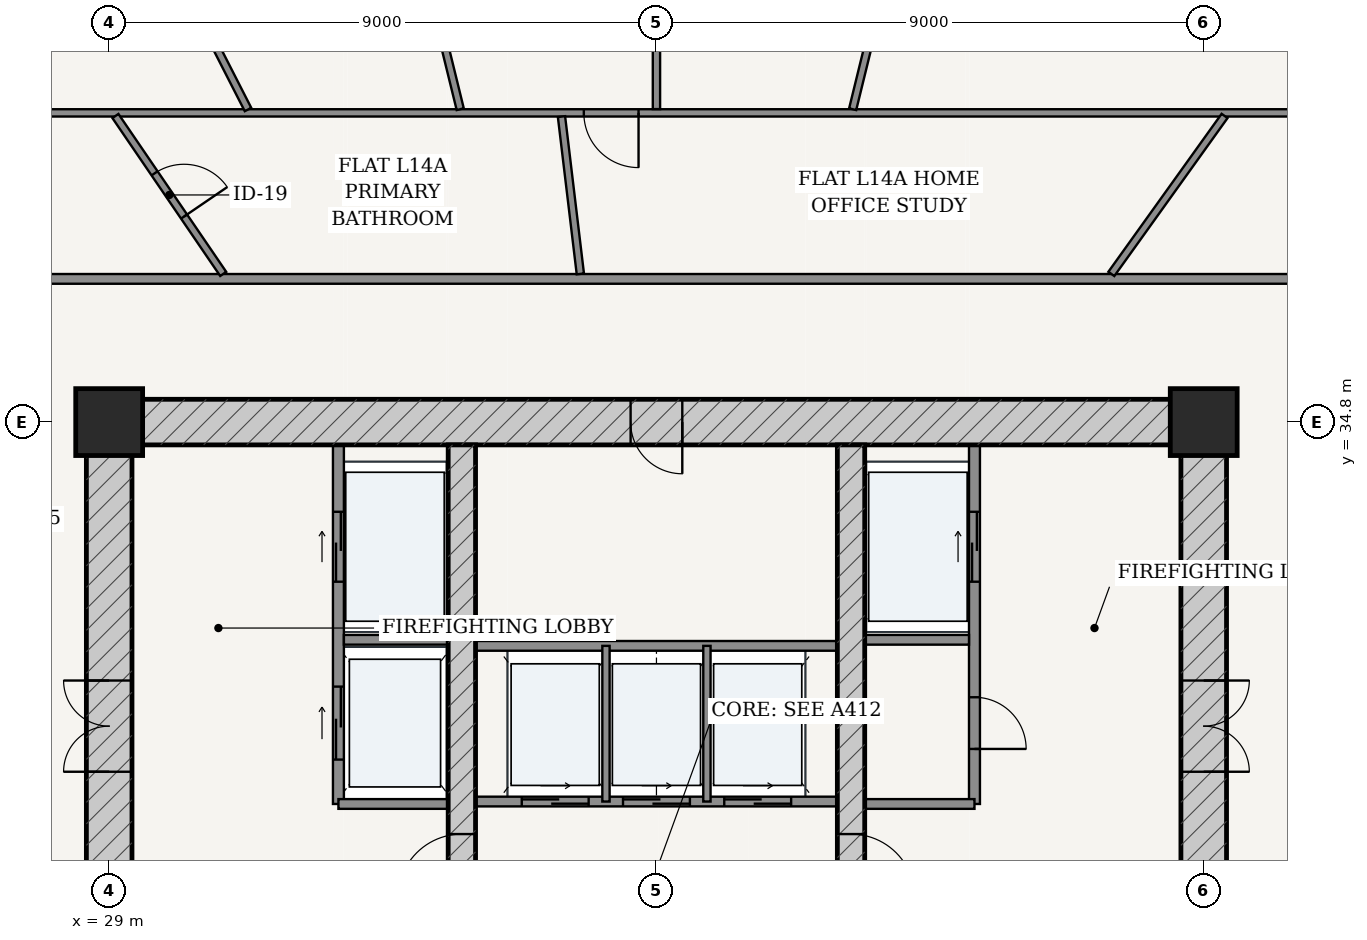
"""IFC4 building model, lengths in metres.
Left out: names, types, materials, properties, quantities, classifications, styles, units other than length and angle.
Written with IfcOpenShell. Run it as: python <this file> out.ifc"""

import sys

from ifc_helpers import new_model, si_unit, direction, frame, frame_2d, origin, origin_2d, place, context, subcontext, project, spatial, rectangle, extrude, source, transform, mapped, element, fill, save


model = new_model("IFC4")
c1 = context("Model", 3, precision=1e-05, world=origin(), true_north=direction((-0.2419218956, 0.970295726276)))
c2 = subcontext(c1, "Body", "Model", "MODEL_VIEW")
j1 = project(units=[si_unit("LENGTHUNIT", "METRE"), si_unit("PLANEANGLEUNIT", "RADIAN")], contexts=[c1])
p1 = place(None, origin())
s1 = spatial("IfcSite", under=j1, at=p1, CompositionType="ELEMENT")
p2 = place(p1, origin())
s2 = spatial("IfcBuilding", under=s1, at=p2, CompositionType="ELEMENT")
p3 = place(p2, frame((0.0, 0.0, 56.4)))
s3 = spatial("IfcBuildingStorey", under=s2, at=p3, CompositionType="ELEMENT", Elevation=56.4)
for number, where, z_axis, x_axis in (
    (1, (47.0, 34.8, 0.0), (0.0, 0.0, 1.0), (1.0, 0.0, 0.0)),
    (2, (29.0, 34.8, 0.0), (0.0, 0.0, 1.0), (1.0, 0.0, 0.0)),
):
    element("IfcColumn", number, at=place(p3, frame(where, z_axis=z_axis, x_axis=x_axis)), inside=s3, PredefinedType="COLUMN", context=c2, shape_type="SweptSolid", body=[
        extrude(rectangle(XDim=1.1, YDim=1.1, at=origin_2d()), origin(), (0.0, 0.0, 1.0), 3.6),
    ])
p4 = place(p3, frame((28.625, 34.8, 0.0), z_axis=(0.0, 0.0, 1.0), x_axis=(1.0, 0.0, 0.0)))
e3 = element("IfcWall", 3, at=p4, inside=s3, PredefinedType="SHEAR", context=c2, shape_type="SweptSolid", body=[
    extrude(rectangle(XDim=18.75, YDim=0.75, at=frame_2d((9.375, 0.0))), origin(), (0.0, 0.0, 1.0), 3.32),
])
p5 = place(p4, frame((8.95, 0.0, 0.0)))
e4 = element("IfcOpeningElement", 4, at=p5, cuts=e3, PredefinedType="OPENING", context=c2, shape_type="SweptSolid", body=[
    extrude(rectangle(XDim=0.85, YDim=2.1, at=frame_2d((0.425, 1.05))), frame((0.0, 0.385, 0.0), z_axis=(0.0, -1.0, 0.0), x_axis=(1.0, 0.0, 0.0)), (0.0, 0.0, 1.0), 0.77),
])
p6 = place(p3, frame((29.0, 19.175, 0.0), z_axis=(0.0, 0.0, 1.0), x_axis=(0.0, 1.0, 0.0)))
e5 = element("IfcWall", 5, at=p6, inside=s3, PredefinedType="SHEAR", context=c2, shape_type="SweptSolid", body=[
    extrude(rectangle(XDim=15.25, YDim=0.75, at=frame_2d((7.625, 0.0))), origin(), (0.0, 0.0, 1.0), 3.32),
])
p7 = place(p6, frame((9.875, 0.0, 0.0)))
e6 = element("IfcOpeningElement", 6, at=p7, cuts=e5, PredefinedType="OPENING", context=c2, shape_type="SweptSolid", body=[
    extrude(rectangle(XDim=1.5, YDim=2.2, at=frame_2d((0.75, 1.1))), frame((0.0, 0.385, 0.0), z_axis=(0.0, -1.0, 0.0), x_axis=(1.0, 0.0, 0.0)), (0.0, 0.0, 1.0), 0.77),
])
p8 = place(p3, frame((47.0, 19.175, 0.0), z_axis=(0.0, 0.0, 1.0), x_axis=(0.0, 1.0, 0.0)))
e7 = element("IfcWall", 7, at=p8, inside=s3, PredefinedType="SHEAR", context=c2, shape_type="SweptSolid", body=[
    extrude(rectangle(XDim=15.25, YDim=0.75, at=frame_2d((7.625, 0.0))), origin(), (0.0, 0.0, 1.0), 3.32),
])
p9 = place(p8, frame((9.875, 0.0, 0.0)))
e8 = element("IfcOpeningElement", 8, at=p9, cuts=e7, PredefinedType="OPENING", context=c2, shape_type="SweptSolid", body=[
    extrude(rectangle(XDim=1.5, YDim=2.2, at=frame_2d((0.75, 1.1))), frame((0.0, 0.385, 0.0), z_axis=(0.0, -1.0, 0.0), x_axis=(1.0, 0.0, 0.0)), (0.0, 0.0, 1.0), 0.77),
])
p10 = place(p3, frame((34.8, 19.175, 0.0), z_axis=(0.0, 0.0, 1.0), x_axis=(0.0, 1.0, 0.0)))
e9 = element("IfcWall", 9, at=p10, inside=s3, PredefinedType="SHEAR", context=c2, shape_type="SweptSolid", body=[
    extrude(rectangle(XDim=15.25, YDim=0.45, at=frame_2d((7.625, 0.0))), origin(), (0.0, 0.0, 1.0), 3.32),
])
p11 = place(p10, frame((7.8, 0.0, 0.0)))
e10 = element("IfcOpeningElement", 10, at=p11, cuts=e9, PredefinedType="OPENING", context=c2, shape_type="SweptSolid", body=[
    extrude(rectangle(XDim=1.05, YDim=2.15, at=frame_2d((0.525, 1.075))), frame((0.0, 0.235, 0.0), z_axis=(0.0, -1.0, 0.0), x_axis=(1.0, 0.0, 0.0)), (0.0, 0.0, 1.0), 0.47),
])
p12 = place(p3, frame((41.2, 19.175, 0.0), z_axis=(0.0, 0.0, 1.0), x_axis=(0.0, 1.0, 0.0)))
e11 = element("IfcWall", 11, at=p12, inside=s3, PredefinedType="SHEAR", context=c2, shape_type="SweptSolid", body=[
    extrude(rectangle(XDim=15.25, YDim=0.45, at=frame_2d((7.625, 0.0))), origin(), (0.0, 0.0, 1.0), 3.32),
])
p13 = place(p12, frame((7.8, 0.0, 0.0)))
e12 = element("IfcOpeningElement", 12, at=p13, cuts=e11, PredefinedType="OPENING", context=c2, shape_type="SweptSolid", body=[
    extrude(rectangle(XDim=1.05, YDim=2.15, at=frame_2d((0.525, 1.075))), frame((0.0, 0.235, 0.0), z_axis=(0.0, -1.0, 0.0), x_axis=(1.0, 0.0, 0.0)), (0.0, 0.0, 1.0), 0.47),
])
p14 = place(p3, frame((32.77, 28.52, 0.0), z_axis=(0.0, 0.0, 1.0), x_axis=(0.0, 1.0, 0.0)))
e13 = element("IfcWall", 13, at=p14, inside=s3, PredefinedType="PARTITIONING", context=c2, shape_type="SweptSolid", body=[
    extrude(rectangle(XDim=5.905, YDim=0.18, at=frame_2d((2.953, 0.0))), origin(), (0.0, 0.0, 1.0), 3.32),
])
p15 = place(p14, frame((3.655, 0.0, 0.0)))
e14 = element("IfcOpeningElement", 14, at=p15, cuts=e13, PredefinedType="OPENING", context=c2, shape_type="SweptSolid", body=[
    extrude(rectangle(XDim=1.15, YDim=2.2, at=frame_2d((0.575, 1.1))), frame((0.0, 0.1, 0.0), z_axis=(0.0, -1.0, 0.0), x_axis=(1.0, 0.0, 0.0)), (0.0, 0.0, 1.0), 0.2),
])
p16 = place(p14, frame((0.73, 0.0, 0.0)))
e15 = element("IfcOpeningElement", 15, at=p16, cuts=e13, PredefinedType="OPENING", context=c2, shape_type="SweptSolid", body=[
    extrude(rectangle(XDim=1.2, YDim=2.25, at=frame_2d((0.6, 1.125))), frame((0.0, 0.1, 0.0), z_axis=(0.0, -1.0, 0.0), x_axis=(1.0, 0.0, 0.0)), (0.0, 0.0, 1.0), 0.2),
])
p17 = place(p3, frame((32.86, 31.22, 0.0), z_axis=(0.0, 0.0, 1.0), x_axis=(1.0, 0.0, 0.0)))
e16 = element("IfcWall", 16, at=p17, inside=s3, PredefinedType="PARTITIONING", context=c2, shape_type="SweptSolid", body=[
    extrude(rectangle(XDim=1.715, YDim=0.16, at=frame_2d((0.857, 0.0))), origin(), (0.0, 0.0, 1.0), 3.32),
])
p18 = place(p3, frame((32.77, 28.52, 0.0), z_axis=(0.0, 0.0, 1.0), x_axis=(1.0, 0.0, 0.0)))
e17 = element("IfcWall", 17, at=p18, inside=s3, PredefinedType="PARTITIONING", context=c2, shape_type="SweptSolid", body=[
    extrude(rectangle(XDim=1.805, YDim=0.16, at=frame_2d((0.902, 0.0))), origin(), (0.0, 0.0, 1.0), 3.32),
])
p19 = place(p3, frame((43.23, 28.52, 0.0), z_axis=(0.0, 0.0, 1.0), x_axis=(0.0, 1.0, 0.0)))
e18 = element("IfcWall", 18, at=p19, inside=s3, PredefinedType="PARTITIONING", context=c2, shape_type="SweptSolid", body=[
    extrude(rectangle(XDim=5.905, YDim=0.18, at=frame_2d((2.953, 0.0))), origin(), (0.0, 0.0, 1.0), 3.32),
])
p20 = place(p19, frame((0.905, 0.0, 0.0)))
e19 = element("IfcOpeningElement", 19, at=p20, cuts=e18, PredefinedType="OPENING", context=c2, shape_type="SweptSolid", body=[
    extrude(rectangle(XDim=0.85, YDim=2.1, at=frame_2d((0.425, 1.05))), frame((0.0, 0.1, 0.0), z_axis=(0.0, -1.0, 0.0), x_axis=(1.0, 0.0, 0.0)), (0.0, 0.0, 1.0), 0.2),
])
p21 = place(p19, frame((3.655, 0.0, 0.0)))
e20 = element("IfcOpeningElement", 20, at=p21, cuts=e18, PredefinedType="OPENING", context=c2, shape_type="SweptSolid", body=[
    extrude(rectangle(XDim=1.15, YDim=2.2, at=frame_2d((0.575, 1.1))), frame((0.0, 0.1, 0.0), z_axis=(0.0, -1.0, 0.0), x_axis=(1.0, 0.0, 0.0)), (0.0, 0.0, 1.0), 0.2),
])
p22 = place(p3, frame((41.425, 31.22, 0.0), z_axis=(0.0, 0.0, 1.0), x_axis=(1.0, 0.0, 0.0)))
e21 = element("IfcWall", 21, at=p22, inside=s3, PredefinedType="PARTITIONING", context=c2, shape_type="SweptSolid", body=[
    extrude(rectangle(XDim=1.715, YDim=0.16, at=frame_2d((0.857, 0.0))), origin(), (0.0, 0.0, 1.0), 3.32),
])
p23 = place(p3, frame((41.425, 28.52, 0.0), z_axis=(0.0, 0.0, 1.0), x_axis=(1.0, 0.0, 0.0)))
e22 = element("IfcWall", 22, at=p23, inside=s3, PredefinedType="PARTITIONING", context=c2, shape_type="SweptSolid", body=[
    extrude(rectangle(XDim=1.805, YDim=0.16, at=frame_2d((0.902, 0.0))), origin(), (0.0, 0.0, 1.0), 3.32),
])
p24 = place(p3, frame((35.025, 28.56, 0.0), z_axis=(0.0, 0.0, 1.0), x_axis=(1.0, 0.0, 0.0)))
e23 = element("IfcWall", 23, at=p24, inside=s3, PredefinedType="PARTITIONING", context=c2, shape_type="SweptSolid", body=[
    extrude(rectangle(XDim=5.95, YDim=0.16, at=frame_2d((2.975, 0.0))), origin(), (0.0, 0.0, 1.0), 3.32),
])
p25 = place(p24, frame((0.76, 0.0, 0.0)))
e24 = element("IfcOpeningElement", 24, at=p25, cuts=e23, PredefinedType="OPENING", context=c2, shape_type="SweptSolid", body=[
    extrude(rectangle(XDim=1.1, YDim=2.2, at=frame_2d((0.55, 1.1))), frame((0.0, 0.09, 0.0), z_axis=(0.0, -1.0, 0.0), x_axis=(1.0, 0.0, 0.0)), (0.0, 0.0, 1.0), 0.18),
])
p26 = place(p24, frame((2.425, 0.0, 0.0)))
e25 = element("IfcOpeningElement", 25, at=p26, cuts=e23, PredefinedType="OPENING", context=c2, shape_type="SweptSolid", body=[
    extrude(rectangle(XDim=1.1, YDim=2.2, at=frame_2d((0.55, 1.1))), frame((0.0, 0.09, 0.0), z_axis=(0.0, -1.0, 0.0), x_axis=(1.0, 0.0, 0.0)), (0.0, 0.0, 1.0), 0.18),
])
p27 = place(p24, frame((4.09, 0.0, 0.0)))
e26 = element("IfcOpeningElement", 26, at=p27, cuts=e23, PredefinedType="OPENING", context=c2, shape_type="SweptSolid", body=[
    extrude(rectangle(XDim=1.1, YDim=2.2, at=frame_2d((0.55, 1.1))), frame((0.0, 0.09, 0.0), z_axis=(0.0, -1.0, 0.0), x_axis=(1.0, 0.0, 0.0)), (0.0, 0.0, 1.0), 0.18),
])
p28 = place(p3, frame((35.025, 31.12, 0.0), z_axis=(0.0, 0.0, 1.0), x_axis=(1.0, 0.0, 0.0)))
e27 = element("IfcWall", 27, at=p28, inside=s3, PredefinedType="PARTITIONING", context=c2, shape_type="SweptSolid", body=[
    extrude(rectangle(XDim=5.95, YDim=0.16, at=frame_2d((2.975, 0.0))), origin(), (0.0, 0.0, 1.0), 3.32),
])
for number, where, z_axis, x_axis in (
    (28, (37.17, 28.56, 0.0), (0.0, 0.0, 1.0), (0.0, 1.0, 0.0)),
    (29, (38.83, 28.56, 0.0), (0.0, 0.0, 1.0), (0.0, 1.0, 0.0)),
):
    element("IfcWall", number, at=place(p3, frame(where, z_axis=z_axis, x_axis=x_axis)), inside=s3, PredefinedType="PARTITIONING", context=c2, shape_type="SweptSolid", body=[
        extrude(rectangle(XDim=2.56, YDim=0.12, at=frame_2d((1.28, 0.0))), origin(), (0.0, 0.0, 1.0), 3.32),
    ])
p29 = place(p3, frame((26.645, 37.155, 0.0), z_axis=(0.0, 0.0, 1.0), x_axis=(1.0, 0.0, 0.0)))
e30 = element("IfcWall", 30, at=p29, inside=s3, PredefinedType="PARTITIONING", context=c2, shape_type="SweptSolid", body=[
    extrude(rectangle(XDim=22.71, YDim=0.16, at=frame_2d((11.355, 0.0))), origin(), (0.0, 0.0, 1.0), 2.688),
])
p30 = place(p3, frame((23.915, 39.885, 0.0), z_axis=(0.0, 0.0, 1.0), x_axis=(1.0, 0.0, 0.0)))
e31 = element("IfcWall", 31, at=p30, inside=s3, PredefinedType="PARTITIONING", context=c2, shape_type="SweptSolid", body=[
    extrude(rectangle(XDim=28.17, YDim=0.12, at=frame_2d((14.085, 0.0))), origin(), (0.0, 0.0, 1.0), 2.688),
])
p31 = place(p30, frame((12.891, 0.0, 0.0)))
e32 = element("IfcOpeningElement", 32, at=p31, cuts=e31, PredefinedType="OPENING", context=c2, shape_type="SweptSolid", body=[
    extrude(rectangle(XDim=0.9, YDim=2.15, at=frame_2d((0.45, 1.075))), frame((0.0, 0.07, 0.0), z_axis=(0.0, -1.0, 0.0), x_axis=(1.0, 0.0, 0.0)), (0.0, 0.0, 1.0), 0.14),
])
p32 = place(p3, frame((41.227, 39.945, 0.0), z_axis=(0.0, 0.0, 1.0), x_axis=(0.238375747469, 0.97117300365, 0.0)))
e33 = element("IfcWall", 33, at=p32, inside=s3, PredefinedType="PARTITIONING", context=c2, shape_type="SweptSolid", body=[
    extrude(rectangle(XDim=10.086, YDim=0.12, at=frame_2d((5.043, 0.0))), origin(), (0.0, 0.0, 1.0), 2.688),
])
p33 = place(p32, frame((3.518, 0.0, 0.0)))
e34 = element("IfcOpeningElement", 34, at=p33, cuts=e33, PredefinedType="OPENING", context=c2, shape_type="SweptSolid", body=[
    extrude(rectangle(XDim=0.9, YDim=2.15, at=frame_2d((0.45, 1.075))), frame((0.0, 0.07, 0.0), z_axis=(0.0, -1.0, 0.0), x_axis=(1.0, 0.0, 0.0)), (0.0, 0.0, 1.0), 0.14),
])
p34 = place(p3, frame((38.0, 39.947, 0.0), z_axis=(0.0, 0.0, 1.0), x_axis=(0.0, 1.0, 0.0)))
e35 = element("IfcWall", 35, at=p34, inside=s3, PredefinedType="PARTITIONING", context=c2, shape_type="SweptSolid", body=[
    extrude(rectangle(XDim=10.293, YDim=0.12, at=frame_2d((5.146, 0.0))), origin(), (0.0, 0.0, 1.0), 2.762),
])
p35 = place(p34, frame((4.697, 0.0, 0.0)))
e36 = element("IfcOpeningElement", 36, at=p35, cuts=e35, PredefinedType="OPENING", context=c2, shape_type="SweptSolid", body=[
    extrude(rectangle(XDim=0.9, YDim=2.15, at=frame_2d((0.45, 1.075))), frame((0.0, 0.07, 0.0), z_axis=(0.0, -1.0, 0.0), x_axis=(1.0, 0.0, 0.0)), (0.0, 0.0, 1.0), 0.14),
])
p36 = place(p3, frame((34.773, 39.945, 0.0), z_axis=(0.0, 0.0, 1.0), x_axis=(-0.238375747469, 0.97117300365, 0.0)))
e37 = element("IfcWall", 37, at=p36, inside=s3, PredefinedType="PARTITIONING", context=c2, shape_type="SweptSolid", body=[
    extrude(rectangle(XDim=10.086, YDim=0.12, at=frame_2d((5.043, 0.0))), origin(), (0.0, 0.0, 1.0), 2.688),
])
p37 = place(p36, frame((3.519, 0.0, 0.0)))
e38 = element("IfcOpeningElement", 38, at=p37, cuts=e37, PredefinedType="OPENING", context=c2, shape_type="SweptSolid", body=[
    extrude(rectangle(XDim=0.9, YDim=2.15, at=frame_2d((0.45, 1.075))), frame((0.0, 0.07, 0.0), z_axis=(0.0, -1.0, 0.0), x_axis=(1.0, 0.0, 0.0)), (0.0, 0.0, 1.0), 0.14),
])
p38 = place(p3, frame((31.283, 39.94, 0.0), z_axis=(0.0, 0.0, 1.0), x_axis=(-0.455131303234, 0.890424335256, 0.0)))
e39 = element("IfcWall", 39, at=p38, inside=s3, PredefinedType="PARTITIONING", context=c2, shape_type="SweptSolid", body=[
    extrude(rectangle(XDim=9.562, YDim=0.12, at=frame_2d((4.781, 0.0))), origin(), (0.0, 0.0, 1.0), 2.762),
])
p39 = place(p38, frame((4.331, 0.0, 0.0)))
e40 = element("IfcOpeningElement", 40, at=p39, cuts=e39, PredefinedType="OPENING", context=c2, shape_type="SweptSolid", body=[
    extrude(rectangle(XDim=0.9, YDim=2.15, at=frame_2d((0.45, 1.075))), frame((0.0, 0.07, 0.0), z_axis=(0.0, -1.0, 0.0), x_axis=(1.0, 0.0, 0.0)), (0.0, 0.0, 1.0), 0.14),
])
p40 = place(p3, frame((45.481, 37.237, 0.0), z_axis=(0.0, 0.0, 1.0), x_axis=(0.582530715463, 0.812808689387, 0.0)))
e41 = element("IfcWall", 41, at=p40, inside=s3, PredefinedType="PARTITIONING", context=c2, shape_type="SweptSolid", body=[
    extrude(rectangle(XDim=3.197, YDim=0.12, at=frame_2d((1.598, 0.0))), origin(), (0.0, 0.0, 1.0), 3.32),
])
p41 = place(p3, frame((36.749, 37.237, 0.0), z_axis=(0.0, 0.0, 1.0), x_axis=(-0.119119351225, 0.992879942472, 0.0)))
e42 = element("IfcWall", 42, at=p41, inside=s3, PredefinedType="PARTITIONING", context=c2, shape_type="SweptSolid", body=[
    extrude(rectangle(XDim=2.605, YDim=0.12, at=frame_2d((1.302, 0.0))), origin(), (0.0, 0.0, 1.0), 3.32),
])
p42 = place(p3, frame((30.875, 37.237, 0.0), z_axis=(0.0, 0.0, 1.0), x_axis=(-0.563751131022, 0.825944708967, 0.0)))
e43 = element("IfcWall", 43, at=p42, inside=s3, PredefinedType="PARTITIONING", context=c2, shape_type="SweptSolid", body=[
    extrude(rectangle(XDim=3.145, YDim=0.12, at=frame_2d((1.572, 0.0))), origin(), (0.0, 0.0, 1.0), 3.32),
])
p43 = place(p42, frame((1.142, 0.0, 0.0)))
e44 = element("IfcOpeningElement", 44, at=p43, cuts=e43, PredefinedType="OPENING", context=c2, shape_type="SweptSolid", body=[
    extrude(rectangle(XDim=0.86, YDim=2.15, at=frame_2d((0.43, 1.075))), frame((0.0, 0.07, 0.0), z_axis=(0.0, -1.0, 0.0), x_axis=(1.0, 0.0, 0.0)), (0.0, 0.0, 1.0), 0.14),
])
m1 = source(origin(), c2, "Body", "SweptSolid", [
    extrude(rectangle(XDim=1.5, YDim=2.2, at=frame_2d((0.75, 1.1))), frame((0.0, 0.025, 0.0), z_axis=(0.0, -1.0, 0.0), x_axis=(1.0, 0.0, 0.0)), (0.0, 0.0, 1.0), 0.05),
])
p44 = place(p7, origin())
e45 = element("IfcDoor", 45, at=p44, inside=s3, OperationType="DOUBLE_DOOR_SINGLE_SWING", PredefinedType="DOOR", context=c2, shape_type="MappedRepresentation", body=[
    mapped(m1, transform((0.0, 0.0, 0.0), scale=1.0)),
])
fill(e6, e45)
p45 = place(p9, frame((1.5, 0.0, 0.0), z_axis=(0.0, 0.0, 1.0), x_axis=(-1.0, 0.0, 0.0)))
e46 = element("IfcDoor", 46, at=p45, inside=s3, OperationType="DOUBLE_DOOR_SINGLE_SWING", PredefinedType="DOOR", context=c2, shape_type="MappedRepresentation", body=[
    mapped(m1, transform((0.0, 0.0, 0.0), scale=1.0)),
])
fill(e8, e46)
m2 = source(origin(), c2, "Body", "SweptSolid", [
    extrude(rectangle(XDim=1.05, YDim=2.15, at=frame_2d((0.525, 1.075))), frame((0.0, 0.025, 0.0), z_axis=(0.0, -1.0, 0.0), x_axis=(1.0, 0.0, 0.0)), (0.0, 0.0, 1.0), 0.05),
])
p46 = place(p11, origin())
e47 = element("IfcDoor", 47, at=p46, inside=s3, OperationType="SINGLE_SWING_LEFT", PredefinedType="DOOR", context=c2, shape_type="MappedRepresentation", body=[
    mapped(m2, transform((0.0, 0.0, 0.0), scale=1.0)),
])
fill(e10, e47)
p47 = place(p13, frame((1.05, 0.0, 0.0), z_axis=(0.0, 0.0, 1.0), x_axis=(-1.0, 0.0, 0.0)))
e48 = element("IfcDoor", 48, at=p47, inside=s3, OperationType="SINGLE_SWING_RIGHT", PredefinedType="DOOR", context=c2, shape_type="MappedRepresentation", body=[
    mapped(m2, transform((0.0, 0.0, 0.0), scale=1.0)),
])
fill(e12, e48)
m3 = source(origin(), c2, "Body", "SweptSolid", [
    extrude(rectangle(XDim=0.85, YDim=2.1, at=frame_2d((0.425, 1.05))), frame((0.0, 0.025, 0.0), z_axis=(0.0, -1.0, 0.0), x_axis=(1.0, 0.0, 0.0)), (0.0, 0.0, 1.0), 0.05),
])
p48 = place(p20, frame((0.85, 0.0, 0.0), z_axis=(0.0, 0.0, 1.0), x_axis=(-1.0, 0.0, 0.0)))
e49 = element("IfcDoor", 49, at=p48, inside=s3, OperationType="SINGLE_SWING_RIGHT", PredefinedType="DOOR", context=c2, shape_type="MappedRepresentation", body=[
    mapped(m3, transform((0.0, 0.0, 0.0), scale=1.0)),
])
fill(e19, e49)
p49 = place(p5, frame((0.85, 0.0, 0.0), z_axis=(0.0, 0.0, 1.0), x_axis=(-1.0, 0.0, 0.0)))
e50 = element("IfcDoor", 50, at=p49, inside=s3, OperationType="SINGLE_SWING_LEFT", PredefinedType="DOOR", context=c2, shape_type="MappedRepresentation", body=[
    mapped(m3, transform((0.0, 0.0, 0.0), scale=1.0)),
])
fill(e4, e50)
m4 = source(origin(), c2, "Body", "SweptSolid", [
    extrude(rectangle(XDim=1.15, YDim=2.2, at=frame_2d((0.575, 1.1))), frame((0.0, 0.025, 0.0), z_axis=(0.0, -1.0, 0.0), x_axis=(1.0, 0.0, 0.0)), (0.0, 0.0, 1.0), 0.05),
])
p50 = place(p15, origin())
e51 = element("IfcDoor", 51, at=p50, inside=s3, OperationType="DOUBLE_DOOR_SLIDING", PredefinedType="DOOR", context=c2, shape_type="MappedRepresentation", body=[
    mapped(m4, transform((0.0, 0.0, 0.0), scale=1.0)),
])
fill(e14, e51)
p51 = place(p21, origin())
e52 = element("IfcDoor", 52, at=p51, inside=s3, OperationType="DOUBLE_DOOR_SLIDING", PredefinedType="DOOR", context=c2, shape_type="MappedRepresentation", body=[
    mapped(m4, transform((0.0, 0.0, 0.0), scale=1.0)),
])
fill(e20, e52)
m5 = source(origin(), c2, "Body", "SweptSolid", [
    extrude(rectangle(XDim=1.2, YDim=2.25, at=frame_2d((0.6, 1.125))), frame((0.0, 0.025, 0.0), z_axis=(0.0, -1.0, 0.0), x_axis=(1.0, 0.0, 0.0)), (0.0, 0.0, 1.0), 0.05),
])
p52 = place(p16, origin())
e53 = element("IfcDoor", 53, at=p52, inside=s3, OperationType="DOUBLE_DOOR_SLIDING", PredefinedType="DOOR", context=c2, shape_type="MappedRepresentation", body=[
    mapped(m5, transform((0.0, 0.0, 0.0), scale=1.0)),
])
fill(e15, e53)
m6 = source(origin(), c2, "Body", "SweptSolid", [
    extrude(rectangle(XDim=1.1, YDim=2.2, at=frame_2d((0.55, 1.1))), frame((0.0, 0.025, 0.0), z_axis=(0.0, -1.0, 0.0), x_axis=(1.0, 0.0, 0.0)), (0.0, 0.0, 1.0), 0.05),
])
p53 = place(p25, origin())
e54 = element("IfcDoor", 54, at=p53, inside=s3, OperationType="DOUBLE_DOOR_SLIDING", PredefinedType="DOOR", context=c2, shape_type="MappedRepresentation", body=[
    mapped(m6, transform((0.0, 0.0, 0.0), scale=1.0)),
])
fill(e24, e54)
p54 = place(p26, origin())
e55 = element("IfcDoor", 55, at=p54, inside=s3, OperationType="DOUBLE_DOOR_SLIDING", PredefinedType="DOOR", context=c2, shape_type="MappedRepresentation", body=[
    mapped(m6, transform((0.0, 0.0, 0.0), scale=1.0)),
])
fill(e25, e55)
p55 = place(p27, origin())
e56 = element("IfcDoor", 56, at=p55, inside=s3, OperationType="DOUBLE_DOOR_SLIDING", PredefinedType="DOOR", context=c2, shape_type="MappedRepresentation", body=[
    mapped(m6, transform((0.0, 0.0, 0.0), scale=1.0)),
])
fill(e26, e56)
m7 = source(origin(), c2, "Body", "SweptSolid", [
    extrude(rectangle(XDim=0.86, YDim=2.15, at=frame_2d((0.43, 1.075))), frame((0.0, 0.025, 0.0), z_axis=(0.0, -1.0, 0.0), x_axis=(1.0, 0.0, 0.0)), (0.0, 0.0, 1.0), 0.05),
])
p56 = place(p43, frame((0.86, 0.0, 0.0), z_axis=(0.0, 0.0, 1.0), x_axis=(-1.0, 0.0, 0.0)))
e57 = element("IfcDoor", 57, at=p56, inside=s3, OperationType="SINGLE_SWING_RIGHT", PredefinedType="DOOR", context=c2, shape_type="MappedRepresentation", body=[
    mapped(m7, transform((0.0, 0.0, 0.0), scale=1.0)),
])
fill(e44, e57)
m8 = source(origin(), c2, "Body", "SweptSolid", [
    extrude(rectangle(XDim=0.9, YDim=2.15, at=frame_2d((0.45, 1.075))), frame((0.0, 0.025, 0.0), z_axis=(0.0, -1.0, 0.0), x_axis=(1.0, 0.0, 0.0)), (0.0, 0.0, 1.0), 0.05),
])
p57 = place(p31, frame((0.9, 0.0, 0.0), z_axis=(0.0, 0.0, 1.0), x_axis=(-1.0, 0.0, 0.0)))
e58 = element("IfcDoor", 58, at=p57, inside=s3, OperationType="SINGLE_SWING_LEFT", PredefinedType="DOOR", context=c2, shape_type="MappedRepresentation", body=[
    mapped(m8, transform((0.0, 0.0, 0.0), scale=1.0)),
])
fill(e32, e58)
save(model, sys.argv[1])
